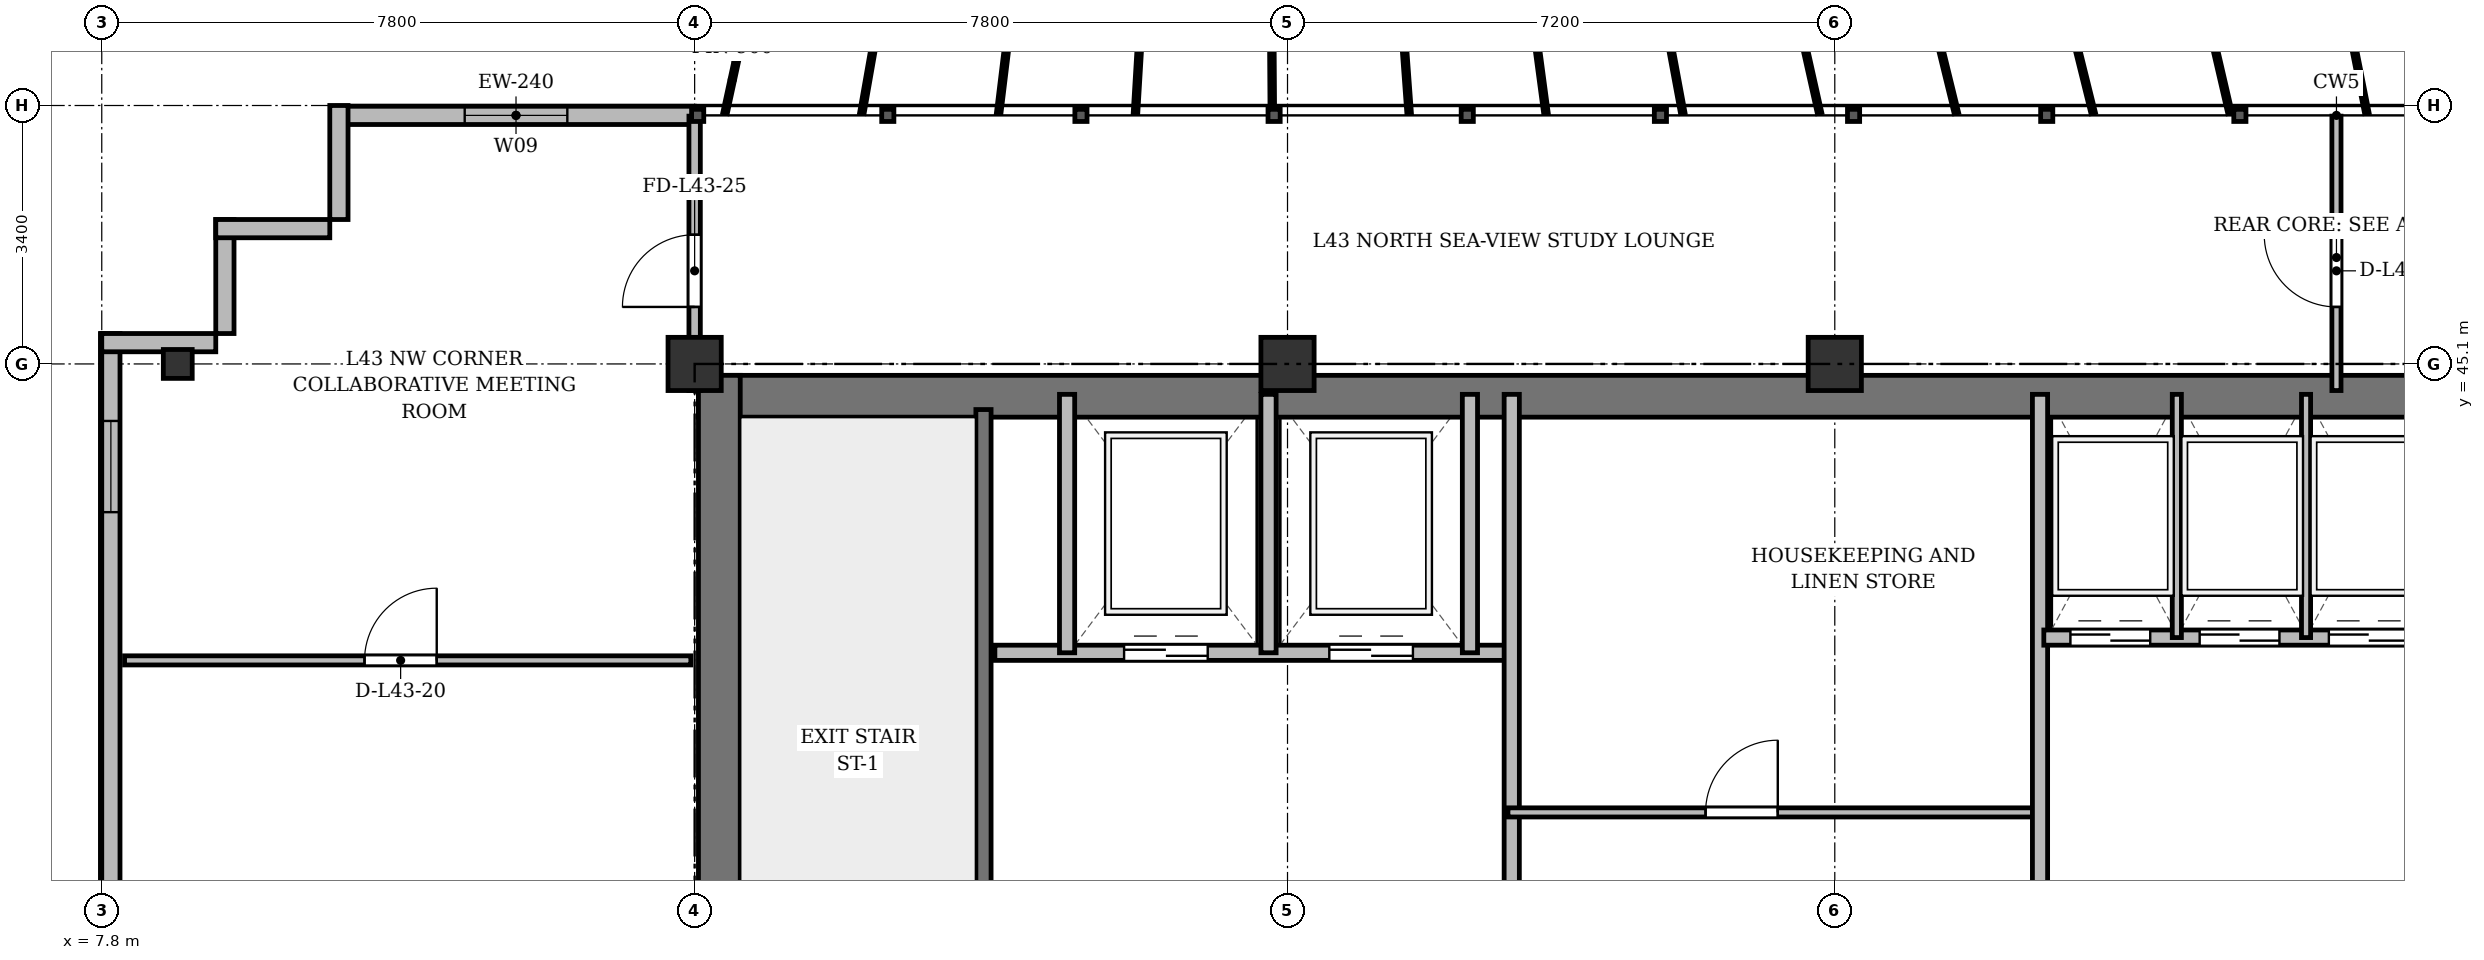
"""IFC4 building model, lengths in metres.
Left out: names, types, materials, properties, quantities, classifications, styles, units other than length and angle.
Written with IfcOpenShell. Run it as: python <this file> out.ifc"""

import sys

from ifc_helpers import new_model, si_unit, direction, frame, frame_2d, origin, origin_2d, place, context, subcontext, project, spatial, rectangle, i_section, extrude, source, transform, mapped, element, fill, save


model = new_model("IFC4")
c1 = context("Model", 3, precision=1e-05, world=origin(), true_north=direction((0.0, 1.0)))
c2 = subcontext(c1, "Body", "Model", "MODEL_VIEW")
j1 = project(units=[si_unit("LENGTHUNIT", "METRE"), si_unit("PLANEANGLEUNIT", "RADIAN")], contexts=[c1])
p1 = place(None, origin())
s1 = spatial("IfcSite", under=j1, at=p1, CompositionType="ELEMENT")
p2 = place(p1, origin())
s2 = spatial("IfcBuilding", under=s1, at=p2, CompositionType="ELEMENT")
p3 = place(p2, frame((0.0, 0.0, 164.5)))
s3 = spatial("IfcBuildingStorey", under=s2, at=p3, CompositionType="ELEMENT", Elevation=164.5)
m1 = source(origin(), c2, "Body", "SweptSolid", [
    extrude(i_section(OverallWidth=0.38, OverallDepth=0.38, WebThickness=0.02, FlangeThickness=0.03, at=origin_2d()), origin(), (0.0, 0.0, 1.0), 3.6),
])
p4 = place(p3, frame((8.8, 45.1, 0.0), z_axis=(0.0, 0.0, 1.0), x_axis=(1.0, 0.0, 0.0)))
e1 = element("IfcColumn", 1, at=p4, inside=s3, PredefinedType="COLUMN", context=c2, shape_type="MappedRepresentation", body=[
    mapped(m1, transform((0.0, 0.0, 0.0), x_axis=(1.0, 0.0, 0.0), y_axis=(0.0, 1.0, 0.0), z_axis=(0.0, 0.0, 1.0), scale=1.0)),
])
m2 = source(origin(), c2, "Body", "SweptSolid", [
    extrude(rectangle(XDim=0.7, YDim=0.7, at=origin_2d()), origin(), (0.0, 0.0, 1.0), 3.6),
])
for number, where, z_axis, x_axis in (
    (2, (15.6, 45.1, 0.0), (0.0, 0.0, 1.0), (1.0, 0.0, 0.0)),
    (3, (23.4, 45.1, 0.0), (0.0, 0.0, 1.0), (1.0, 0.0, 0.0)),
    (4, (30.6, 45.1, 0.0), (0.0, 0.0, 1.0), (1.0, 0.0, 0.0)),
):
    element("IfcColumn", number, at=place(p3, frame(where, z_axis=z_axis, x_axis=x_axis)), inside=s3, PredefinedType="COLUMN", context=c2, shape_type="MappedRepresentation", body=[
        mapped(m2, transform((0.0, 0.0, 0.0), x_axis=(1.0, 0.0, 0.0), y_axis=(0.0, 1.0, 0.0), z_axis=(0.0, 0.0, 1.0), scale=1.0)),
    ])
p5 = place(p3, frame((10.9, 48.37, 0.0), z_axis=(0.0, 0.0, 1.0), x_axis=(1.0, 0.0, 0.0)))
e5 = element("IfcWall", 5, at=p5, inside=s3, PredefinedType="SOLIDWALL", context=c2, shape_type="SweptSolid", body=[
    extrude(rectangle(XDim=4.7, YDim=0.24, at=frame_2d((2.35, 0.0))), origin(), (0.0, 0.0, 1.0), 3.35),
])
p6 = place(p5, frame((1.675, 0.0, 0.9)))
e6 = element("IfcOpeningElement", 6, at=p6, cuts=e5, PredefinedType="OPENING", context=c2, shape_type="SweptSolid", body=[
    extrude(rectangle(XDim=1.35, YDim=1.5, at=frame_2d((0.675, 0.75))), frame((0.0, 0.13, 0.0), z_axis=(0.0, -1.0, 0.0), x_axis=(1.0, 0.0, 0.0)), (0.0, 0.0, 1.0), 0.26),
])
p7 = place(p3, frame((7.92, 6.3, 0.0), z_axis=(0.0, 0.0, 1.0), x_axis=(0.0, 1.0, 0.0)))
e7 = element("IfcWall", 7, at=p7, inside=s3, PredefinedType="SOLIDWALL", context=c2, shape_type="SweptSolid", body=[
    extrude(rectangle(XDim=39.2, YDim=0.24, at=frame_2d((19.6, 0.0))), origin(), (0.0, 0.0, 1.0), 3.35),
])
p8 = place(p7, frame((1.45, 0.0, 0.92)))
e8 = element("IfcOpeningElement", 8, at=p8, cuts=e7, PredefinedType="OPENING", context=c2, shape_type="SweptSolid", body=[
    extrude(rectangle(XDim=1.2, YDim=1.65, at=frame_2d((0.6, 0.825))), frame((0.0, 0.13, 0.0), z_axis=(0.0, -1.0, 0.0), x_axis=(1.0, 0.0, 0.0)), (0.0, 0.0, 1.0), 0.26),
])
p9 = place(p7, frame((3.9, 0.0, 0.92)))
e9 = element("IfcOpeningElement", 9, at=p9, cuts=e7, PredefinedType="OPENING", context=c2, shape_type="SweptSolid", body=[
    extrude(rectangle(XDim=2.4, YDim=2.1, at=frame_2d((1.2, 1.05))), frame((0.0, 0.13, 0.0), z_axis=(0.0, -1.0, 0.0), x_axis=(1.0, 0.0, 0.0)), (0.0, 0.0, 1.0), 0.26),
])
p10 = place(p7, frame((8.1, 0.0, 0.92)))
e10 = element("IfcOpeningElement", 10, at=p10, cuts=e7, PredefinedType="OPENING", context=c2, shape_type="SweptSolid", body=[
    extrude(rectangle(XDim=2.4, YDim=2.1, at=frame_2d((1.2, 1.05))), frame((0.0, 0.13, 0.0), z_axis=(0.0, -1.0, 0.0), x_axis=(1.0, 0.0, 0.0)), (0.0, 0.0, 1.0), 0.26),
])
p11 = place(p7, frame((15.3, 0.0, 0.92)))
e11 = element("IfcOpeningElement", 11, at=p11, cuts=e7, PredefinedType="OPENING", context=c2, shape_type="SweptSolid", body=[
    extrude(rectangle(XDim=2.4, YDim=2.1, at=frame_2d((1.2, 1.05))), frame((0.0, 0.13, 0.0), z_axis=(0.0, -1.0, 0.0), x_axis=(1.0, 0.0, 0.0)), (0.0, 0.0, 1.0), 0.26),
])
p12 = place(p7, frame((29.3, 0.0, 0.92)))
e12 = element("IfcOpeningElement", 12, at=p12, cuts=e7, PredefinedType="OPENING", context=c2, shape_type="SweptSolid", body=[
    extrude(rectangle(XDim=2.4, YDim=2.1, at=frame_2d((1.2, 1.05))), frame((0.0, 0.13, 0.0), z_axis=(0.0, -1.0, 0.0), x_axis=(1.0, 0.0, 0.0)), (0.0, 0.0, 1.0), 0.26),
])
p13 = place(p7, frame((36.85, 0.0, 0.92)))
e13 = element("IfcOpeningElement", 13, at=p13, cuts=e7, PredefinedType="OPENING", context=c2, shape_type="SweptSolid", body=[
    extrude(rectangle(XDim=1.2, YDim=1.65, at=frame_2d((0.6, 0.825))), frame((0.0, 0.13, 0.0), z_axis=(0.0, -1.0, 0.0), x_axis=(1.0, 0.0, 0.0)), (0.0, 0.0, 1.0), 0.26),
])
for number, where, z_axis, x_axis in (
    (14, (7.8, 45.38, 0.0), (0.0, 0.0, 1.0), (1.0, 0.0, 0.0)),
    (15, (9.42, 45.5, 0.0), (0.0, 0.0, 1.0), (0.0, 1.0, 0.0)),
    (16, (9.3, 46.88, 0.0), (0.0, 0.0, 1.0), (1.0, 0.0, 0.0)),
    (17, (10.92, 47.0, 0.0), (0.0, 0.0, 1.0), (0.0, 1.0, 0.0)),
):
    element("IfcWall", number, at=place(p3, frame(where, z_axis=z_axis, x_axis=x_axis)), inside=s3, PredefinedType="SOLIDWALL", context=c2, shape_type="SweptSolid", body=[
        extrude(rectangle(XDim=1.5, YDim=0.24, at=frame_2d((0.75, 0.0))), origin(), (0.0, 0.0, 1.0), 3.35),
    ])
p14 = place(p3, frame((15.65, 44.675, 0.0), z_axis=(0.0, 0.0, 1.0), x_axis=(1.0, 0.0, 0.0)))
e18 = element("IfcWall", 18, at=p14, inside=s3, PredefinedType="SHEAR", context=c2, shape_type="SweptSolid", body=[
    extrude(rectangle(XDim=43.1, YDim=0.55, at=frame_2d((21.55, 0.0))), origin(), (0.0, 0.0, 1.0), 3.35),
])
p15 = place(p3, frame((15.925, 33.4, 0.0), z_axis=(0.0, 0.0, 1.0), x_axis=(0.0, 1.0, 0.0)))
e19 = element("IfcWall", 19, at=p15, inside=s3, PredefinedType="SHEAR", context=c2, shape_type="SweptSolid", body=[
    extrude(rectangle(XDim=11.55, YDim=0.55, at=frame_2d((5.775, 0.0))), origin(), (0.0, 0.0, 1.0), 3.35),
])
p16 = place(p3, frame((19.4, 33.4, 0.0), z_axis=(0.0, 0.0, 1.0), x_axis=(0.0, 1.0, 0.0)))
e20 = element("IfcWall", 20, at=p16, inside=s3, PredefinedType="SHEAR", context=c2, shape_type="SweptSolid", body=[
    extrude(rectangle(XDim=11.1, YDim=0.2, at=frame_2d((5.55, 0.0))), origin(), (0.0, 0.0, 1.0), 3.35),
])
p17 = place(p16, frame((0.85, 0.0, 0.0)))
e21 = element("IfcOpeningElement", 21, at=p17, cuts=e20, PredefinedType="OPENING", context=c2, shape_type="SweptSolid", body=[
    extrude(rectangle(XDim=1.1, YDim=2.15, at=frame_2d((0.55, 1.075))), frame((0.0, 0.11, 0.0), z_axis=(0.0, -1.0, 0.0), x_axis=(1.0, 0.0, 0.0)), (0.0, 0.0, 1.0), 0.22),
])
p18 = place(p3, frame((19.55, 41.3, 0.0), z_axis=(0.0, 0.0, 1.0), x_axis=(1.0, 0.0, 0.0)))
e22 = element("IfcWall", 22, at=p18, inside=s3, PredefinedType="SOLIDWALL", context=c2, shape_type="SweptSolid", body=[
    extrude(rectangle(XDim=6.75, YDim=0.2, at=frame_2d((3.375, 0.0))), origin(), (0.0, 0.0, 1.0), 3.35),
])
p19 = place(p18, frame((1.7, 0.0, 0.0)))
e23 = element("IfcOpeningElement", 23, at=p19, cuts=e22, PredefinedType="OPENING", context=c2, shape_type="SweptSolid", body=[
    extrude(rectangle(XDim=1.1, YDim=2.15, at=frame_2d((0.55, 1.075))), frame((0.0, 0.11, 0.0), z_axis=(0.0, -1.0, 0.0), x_axis=(1.0, 0.0, 0.0)), (0.0, 0.0, 1.0), 0.22),
])
p20 = place(p18, frame((4.4, 0.0, 0.0)))
e24 = element("IfcOpeningElement", 24, at=p20, cuts=e22, PredefinedType="OPENING", context=c2, shape_type="SweptSolid", body=[
    extrude(rectangle(XDim=1.1, YDim=2.15, at=frame_2d((0.55, 1.075))), frame((0.0, 0.11, 0.0), z_axis=(0.0, -1.0, 0.0), x_axis=(1.0, 0.0, 0.0)), (0.0, 0.0, 1.0), 0.22),
])
for number, where, z_axis, x_axis in (
    (25, (20.5, 41.3, 0.0), (0.0, 0.0, 1.0), (0.0, 1.0, 0.0)),
    (26, (23.15, 41.3, 0.0), (0.0, 0.0, 1.0), (0.0, 1.0, 0.0)),
    (27, (25.8, 41.3, 0.0), (0.0, 0.0, 1.0), (0.0, 1.0, 0.0)),
):
    element("IfcWall", number, at=place(p3, frame(where, z_axis=z_axis, x_axis=x_axis)), inside=s3, PredefinedType="SOLIDWALL", context=c2, shape_type="SweptSolid", body=[
        extrude(rectangle(XDim=3.4, YDim=0.2, at=frame_2d((1.7, 0.0))), origin(), (0.0, 0.0, 1.0), 3.35),
    ])
p21 = place(p3, frame((26.35, 33.4, 0.0), z_axis=(0.0, 0.0, 1.0), x_axis=(0.0, 1.0, 0.0)))
e28 = element("IfcWall", 28, at=p21, inside=s3, PredefinedType="SOLIDWALL", context=c2, shape_type="SweptSolid", body=[
    extrude(rectangle(XDim=11.3, YDim=0.2, at=frame_2d((5.65, 0.0))), origin(), (0.0, 0.0, 1.0), 2.75),
])
p22 = place(p3, frame((26.3, 39.2, 0.0), z_axis=(0.0, 0.0, 1.0), x_axis=(1.0, 0.0, 0.0)))
e29 = element("IfcWall", 29, at=p22, inside=s3, PredefinedType="PARTITIONING", context=c2, shape_type="SweptSolid", body=[
    extrude(rectangle(XDim=7.0, YDim=0.12, at=frame_2d((3.5, 0.0))), origin(), (0.0, 0.0, 1.0), 2.85),
])
p23 = place(p22, frame((2.6, 0.0, 0.0)))
e30 = element("IfcOpeningElement", 30, at=p23, cuts=e29, PredefinedType="OPENING", context=c2, shape_type="SweptSolid", body=[
    extrude(rectangle(XDim=0.95, YDim=2.15, at=frame_2d((0.475, 1.075))), frame((0.0, 0.07, 0.0), z_axis=(0.0, -1.0, 0.0), x_axis=(1.0, 0.0, 0.0)), (0.0, 0.0, 1.0), 0.14),
])
p24 = place(p3, frame((33.3, 33.4, 0.0), z_axis=(0.0, 0.0, 1.0), x_axis=(0.0, 1.0, 0.0)))
e31 = element("IfcWall", 31, at=p24, inside=s3, PredefinedType="SOLIDWALL", context=c2, shape_type="SweptSolid", body=[
    extrude(rectangle(XDim=11.3, YDim=0.2, at=frame_2d((5.65, 0.0))), origin(), (0.0, 0.0, 1.0), 2.75),
])
p25 = place(p3, frame((33.35, 41.5, 0.0), z_axis=(0.0, 0.0, 1.0), x_axis=(1.0, 0.0, 0.0)))
e32 = element("IfcWall", 32, at=p25, inside=s3, PredefinedType="SOLIDWALL", context=c2, shape_type="SweptSolid", body=[
    extrude(rectangle(XDim=6.9, YDim=0.2, at=frame_2d((3.45, 0.0))), origin(), (0.0, 0.0, 1.0), 3.35),
])
p26 = place(p25, frame((0.35, 0.0, 0.0)))
e33 = element("IfcOpeningElement", 33, at=p26, cuts=e32, PredefinedType="OPENING", context=c2, shape_type="SweptSolid", body=[
    extrude(rectangle(XDim=1.05, YDim=2.15, at=frame_2d((0.525, 1.075))), frame((0.0, 0.11, 0.0), z_axis=(0.0, -1.0, 0.0), x_axis=(1.0, 0.0, 0.0)), (0.0, 0.0, 1.0), 0.22),
])
p27 = place(p25, frame((2.05, 0.0, 0.0)))
e34 = element("IfcOpeningElement", 34, at=p27, cuts=e32, PredefinedType="OPENING", context=c2, shape_type="SweptSolid", body=[
    extrude(rectangle(XDim=1.05, YDim=2.15, at=frame_2d((0.525, 1.075))), frame((0.0, 0.11, 0.0), z_axis=(0.0, -1.0, 0.0), x_axis=(1.0, 0.0, 0.0)), (0.0, 0.0, 1.0), 0.22),
])
p28 = place(p25, frame((3.75, 0.0, 0.0)))
e35 = element("IfcOpeningElement", 35, at=p28, cuts=e32, PredefinedType="OPENING", context=c2, shape_type="SweptSolid", body=[
    extrude(rectangle(XDim=1.05, YDim=2.15, at=frame_2d((0.525, 1.075))), frame((0.0, 0.11, 0.0), z_axis=(0.0, -1.0, 0.0), x_axis=(1.0, 0.0, 0.0)), (0.0, 0.0, 1.0), 0.22),
])
p29 = place(p25, frame((5.45, 0.0, 0.0)))
e36 = element("IfcOpeningElement", 36, at=p29, cuts=e32, PredefinedType="OPENING", context=c2, shape_type="SweptSolid", body=[
    extrude(rectangle(XDim=1.05, YDim=2.15, at=frame_2d((0.525, 1.075))), frame((0.0, 0.11, 0.0), z_axis=(0.0, -1.0, 0.0), x_axis=(1.0, 0.0, 0.0)), (0.0, 0.0, 1.0), 0.22),
])
for number, where, z_axis, x_axis in (
    (37, (35.1, 41.5, 0.0), (0.0, 0.0, 1.0), (0.0, 1.0, 0.0)),
    (38, (36.8, 41.5, 0.0), (0.0, 0.0, 1.0), (0.0, 1.0, 0.0)),
):
    element("IfcWall", number, at=place(p3, frame(where, z_axis=z_axis, x_axis=x_axis)), inside=s3, PredefinedType="PARTITIONING", context=c2, shape_type="SweptSolid", body=[
        extrude(rectangle(XDim=3.2, YDim=0.12, at=frame_2d((1.6, 0.0))), origin(), (0.0, 0.0, 1.0), 3.35),
    ])
p30 = place(p3, frame((8.1, 41.2, 0.0), z_axis=(0.0, 0.0, 1.0), x_axis=(1.0, 0.0, 0.0)))
e39 = element("IfcWall", 39, at=p30, inside=s3, PredefinedType="PARTITIONING", context=c2, shape_type="SweptSolid", body=[
    extrude(rectangle(XDim=7.45, YDim=0.12, at=frame_2d((3.725, 0.0))), origin(), (0.0, 0.0, 1.0), 2.85),
])
p31 = place(p30, frame((3.157, 0.0, 0.0)))
e40 = element("IfcOpeningElement", 40, at=p31, cuts=e39, PredefinedType="OPENING", context=c2, shape_type="SweptSolid", body=[
    extrude(rectangle(XDim=0.95, YDim=2.15, at=frame_2d((0.475, 1.075))), frame((0.0, 0.07, 0.0), z_axis=(0.0, -1.0, 0.0), x_axis=(1.0, 0.0, 0.0)), (0.0, 0.0, 1.0), 0.14),
])
p32 = place(p3, frame((37.2, 44.75, 0.0), z_axis=(0.0, 0.0, 1.0), x_axis=(0.0, 1.0, 0.0)))
e41 = element("IfcWall", 41, at=p32, inside=s3, PredefinedType="PARTITIONING", context=c2, shape_type="SweptSolid", body=[
    extrude(rectangle(XDim=3.61, YDim=0.12, at=frame_2d((1.805, 0.0))), origin(), (0.0, 0.0, 1.0), 2.75),
])
p33 = place(p32, frame((1.1, 0.0, 0.0)))
e42 = element("IfcOpeningElement", 42, at=p33, cuts=e41, PredefinedType="OPENING", context=c2, shape_type="SweptSolid", body=[
    extrude(rectangle(XDim=0.95, YDim=2.15, at=frame_2d((0.475, 1.075))), frame((0.0, 0.07, 0.0), z_axis=(0.0, -1.0, 0.0), x_axis=(1.0, 0.0, 0.0)), (0.0, 0.0, 1.0), 0.14),
])
p34 = place(p3, frame((15.6, 44.75, 0.0), z_axis=(0.0, 0.0, 1.0), x_axis=(0.0, 1.0, 0.0)))
e43 = element("IfcWall", 43, at=p34, inside=s3, PredefinedType="PARTITIONING", context=c2, shape_type="SweptSolid", body=[
    extrude(rectangle(XDim=3.61, YDim=0.15, at=frame_2d((1.805, 0.0))), origin(), (0.0, 0.0, 1.0), 2.85),
])
p35 = place(p34, frame((1.1, 0.0, 0.0)))
e44 = element("IfcOpeningElement", 44, at=p35, cuts=e43, PredefinedType="OPENING", context=c2, shape_type="SweptSolid", body=[
    extrude(rectangle(XDim=0.95, YDim=2.15, at=frame_2d((0.475, 1.075))), frame((0.0, 0.085, 0.0), z_axis=(0.0, -1.0, 0.0), x_axis=(1.0, 0.0, 0.0)), (0.0, 0.0, 1.0), 0.17),
])
m3 = source(origin(), c2, "Body", "SweptSolid", [
    extrude(rectangle(XDim=1.35, YDim=1.5, at=frame_2d((0.675, 0.75))), frame((0.0, 0.03, 0.0), z_axis=(0.0, -1.0, 0.0), x_axis=(1.0, 0.0, 0.0)), (0.0, 0.0, 1.0), 0.06),
])
p36 = place(p6, origin())
e45 = element("IfcWindow", 45, at=p36, inside=s3, PartitioningType="SINGLE_PANEL", PredefinedType="WINDOW", context=c2, shape_type="MappedRepresentation", body=[
    mapped(m3, transform((0.0, 0.0, 0.0), x_axis=(1.0, 0.0, 0.0), y_axis=(0.0, 1.0, 0.0), z_axis=(0.0, 0.0, 1.0), scale=1.0)),
])
fill(e6, e45)
m4 = source(origin(), c2, "Body", "SweptSolid", [
    extrude(rectangle(XDim=1.2, YDim=1.65, at=frame_2d((0.6, 0.825))), frame((0.0, 0.03, 0.0), z_axis=(0.0, -1.0, 0.0), x_axis=(1.0, 0.0, 0.0)), (0.0, 0.0, 1.0), 0.06),
])
p37 = place(p13, origin())
e46 = element("IfcWindow", 46, at=p37, inside=s3, PartitioningType="SINGLE_PANEL", PredefinedType="WINDOW", context=c2, shape_type="MappedRepresentation", body=[
    mapped(m4, transform((0.0, 0.0, 0.0), x_axis=(1.0, 0.0, 0.0), y_axis=(0.0, 1.0, 0.0), z_axis=(0.0, 0.0, 1.0), scale=1.0)),
])
fill(e13, e46)
m5 = source(origin(), c2, "Body", "SweptSolid", [
    extrude(rectangle(XDim=1.1, YDim=2.15, at=frame_2d((0.55, 1.075))), frame((0.0, 0.025, 0.0), z_axis=(0.0, -1.0, 0.0), x_axis=(1.0, 0.0, 0.0)), (0.0, 0.0, 1.0), 0.05),
])
p38 = place(p19, origin())
e47 = element("IfcDoor", 47, at=p38, inside=s3, OperationType="DOUBLE_DOOR_SLIDING", PredefinedType="DOOR", context=c2, shape_type="MappedRepresentation", body=[
    mapped(m5, transform((0.0, 0.0, 0.0), x_axis=(1.0, 0.0, 0.0), y_axis=(0.0, 1.0, 0.0), z_axis=(0.0, 0.0, 1.0), scale=1.0)),
])
fill(e23, e47)
p39 = place(p20, origin())
e48 = element("IfcDoor", 48, at=p39, inside=s3, OperationType="DOUBLE_DOOR_SLIDING", PredefinedType="DOOR", context=c2, shape_type="MappedRepresentation", body=[
    mapped(m5, transform((0.0, 0.0, 0.0), x_axis=(1.0, 0.0, 0.0), y_axis=(0.0, 1.0, 0.0), z_axis=(0.0, 0.0, 1.0), scale=1.0)),
])
fill(e24, e48)
m6 = source(origin(), c2, "Body", "SweptSolid", [
    extrude(rectangle(XDim=0.95, YDim=2.15, at=frame_2d((0.475, 1.075))), frame((0.0, 0.025, 0.0), z_axis=(0.0, -1.0, 0.0), x_axis=(1.0, 0.0, 0.0)), (0.0, 0.0, 1.0), 0.05),
])
p40 = place(p23, origin())
e49 = element("IfcDoor", 49, at=p40, inside=s3, OperationType="SINGLE_SWING_RIGHT", PredefinedType="DOOR", context=c2, shape_type="MappedRepresentation", body=[
    mapped(m6, transform((0.0, 0.0, 0.0), x_axis=(1.0, 0.0, 0.0), y_axis=(0.0, 1.0, 0.0), z_axis=(0.0, 0.0, 1.0), scale=1.0)),
])
fill(e30, e49)
m7 = source(origin(), c2, "Body", "SweptSolid", [
    extrude(rectangle(XDim=1.05, YDim=2.15, at=frame_2d((0.525, 1.075))), frame((0.0, 0.025, 0.0), z_axis=(0.0, -1.0, 0.0), x_axis=(1.0, 0.0, 0.0)), (0.0, 0.0, 1.0), 0.05),
])
p41 = place(p26, origin())
e50 = element("IfcDoor", 50, at=p41, inside=s3, OperationType="DOUBLE_DOOR_SLIDING", PredefinedType="DOOR", context=c2, shape_type="MappedRepresentation", body=[
    mapped(m7, transform((0.0, 0.0, 0.0), x_axis=(1.0, 0.0, 0.0), y_axis=(0.0, 1.0, 0.0), z_axis=(0.0, 0.0, 1.0), scale=1.0)),
])
fill(e33, e50)
p42 = place(p27, origin())
e51 = element("IfcDoor", 51, at=p42, inside=s3, OperationType="DOUBLE_DOOR_SLIDING", PredefinedType="DOOR", context=c2, shape_type="MappedRepresentation", body=[
    mapped(m7, transform((0.0, 0.0, 0.0), x_axis=(1.0, 0.0, 0.0), y_axis=(0.0, 1.0, 0.0), z_axis=(0.0, 0.0, 1.0), scale=1.0)),
])
fill(e34, e51)
p43 = place(p28, origin())
e52 = element("IfcDoor", 52, at=p43, inside=s3, OperationType="DOUBLE_DOOR_SLIDING", PredefinedType="DOOR", context=c2, shape_type="MappedRepresentation", body=[
    mapped(m7, transform((0.0, 0.0, 0.0), x_axis=(1.0, 0.0, 0.0), y_axis=(0.0, 1.0, 0.0), z_axis=(0.0, 0.0, 1.0), scale=1.0)),
])
fill(e35, e52)
p44 = place(p31, origin())
e53 = element("IfcDoor", 53, at=p44, inside=s3, OperationType="SINGLE_SWING_RIGHT", PredefinedType="DOOR", context=c2, shape_type="MappedRepresentation", body=[
    mapped(m6, transform((0.0, 0.0, 0.0), x_axis=(1.0, 0.0, 0.0), y_axis=(0.0, 1.0, 0.0), z_axis=(0.0, 0.0, 1.0), scale=1.0)),
])
fill(e40, e53)
p45 = place(p33, origin())
e54 = element("IfcDoor", 54, at=p45, inside=s3, OperationType="SINGLE_SWING_RIGHT", PredefinedType="DOOR", context=c2, shape_type="MappedRepresentation", body=[
    mapped(m6, transform((0.0, 0.0, 0.0), x_axis=(1.0, 0.0, 0.0), y_axis=(0.0, 1.0, 0.0), z_axis=(0.0, 0.0, 1.0), scale=1.0)),
])
fill(e42, e54)
p46 = place(p35, origin())
e55 = element("IfcDoor", 55, at=p46, inside=s3, OperationType="SINGLE_SWING_LEFT", PredefinedType="DOOR", context=c2, shape_type="MappedRepresentation", body=[
    mapped(m6, transform((0.0, 0.0, 0.0), x_axis=(1.0, 0.0, 0.0), y_axis=(0.0, 1.0, 0.0), z_axis=(0.0, 0.0, 1.0), scale=1.0)),
])
fill(e44, e55)
save(model, sys.argv[1])
